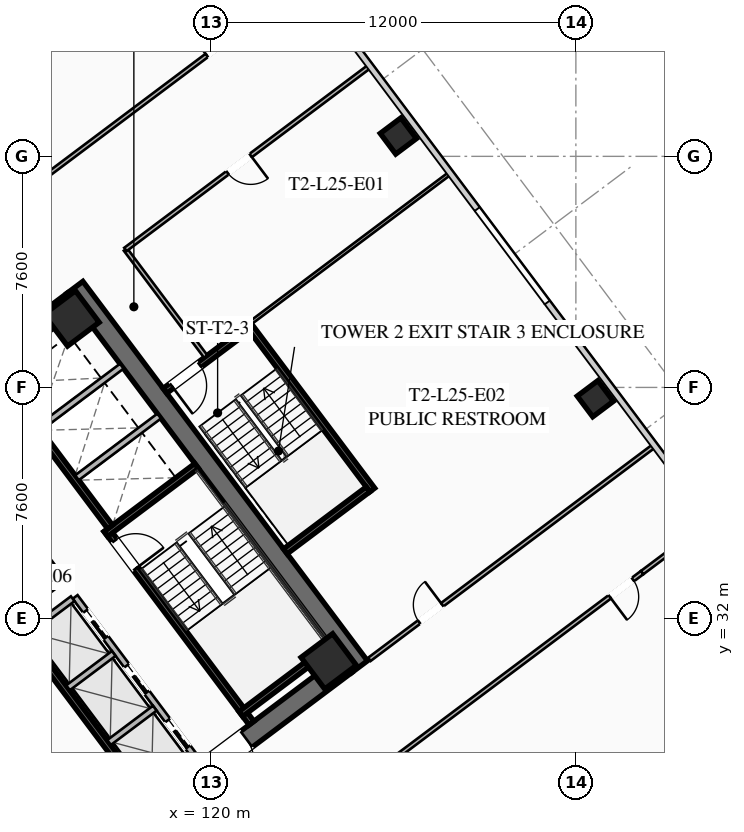
"""IFC4 building model, lengths in metres.
Left out: names, types, materials, properties, quantities, classifications, styles, units other than length and angle.
Written with IfcOpenShell. Run it as: python <this file> out.ifc"""

import sys

from ifc_helpers import new_model, si_unit, direction, frame, frame_2d, origin, origin_2d, place, context, subcontext, project, spatial, rectangle, hollow_rectangle, extrude, element, fill, save


model = new_model("IFC4")
c1 = context("Model", 3, precision=1e-05, world=origin(), true_north=direction((0.0, 1.0)))
c2 = subcontext(c1, "Body", "Model", "MODEL_VIEW")
j1 = project(units=[si_unit("LENGTHUNIT", "METRE"), si_unit("PLANEANGLEUNIT", "RADIAN")], contexts=[c1])
p1 = place(None, origin())
s1 = spatial("IfcSite", under=j1, at=p1, CompositionType="ELEMENT")
p2 = place(p1, origin())
s2 = spatial("IfcBuilding", under=s1, at=p2, CompositionType="ELEMENT")
p3 = place(p2, frame((0.0, 0.0, 95.6)))
s3 = spatial("IfcBuildingStorey", under=s2, at=p3, CompositionType="ELEMENT", Elevation=95.6)
p4 = place(p3, frame((115.524, 42.893, 0.0), z_axis=(0.0, 0.0, 1.0), x_axis=(0.600005007985, -0.799996243986, 0.0)))
e1 = element("IfcWall", 1, at=p4, inside=s3, PredefinedType="SHEAR", context=c2, shape_type="SweptSolid", body=[
    extrude(rectangle(XDim=15.6, YDim=0.65, at=frame_2d((7.8, 0.0))), origin(), (0.0, 0.0, 1.0), 3.55),
])
p5 = place(p3, frame((124.429, 30.478, 0.0), z_axis=(0.0, 0.0, 1.0), x_axis=(-0.799998028465, -0.600002628705, 0.0)))
e2 = element("IfcWall", 2, at=p5, inside=s3, PredefinedType="SHEAR", context=c2, shape_type="SweptSolid", body=[
    extrude(rectangle(XDim=14.86, YDim=0.65, at=frame_2d((7.43, 0.0))), origin(), (0.0, 0.0, 1.0), 3.55),
])
p6 = place(p5, frame((9.13, 0.0, 0.0)))
e3 = element("IfcOpeningElement", 3, at=p6, cuts=e2, PredefinedType="OPENING", context=c2, shape_type="SweptSolid", body=[
    extrude(rectangle(XDim=1.25, YDim=2.25, at=frame_2d((0.625, 1.125))), frame((0.0, 0.335, 0.0), z_axis=(0.0, -1.0, 0.0), x_axis=(1.0, 0.0, 0.0)), (0.0, 0.0, 1.0), 0.67),
])
p7 = place(p5, frame((4.08, 0.0, 0.0)))
e4 = element("IfcOpeningElement", 4, at=p7, cuts=e2, PredefinedType="OPENING", context=c2, shape_type="SweptSolid", body=[
    extrude(rectangle(XDim=1.25, YDim=2.25, at=frame_2d((0.625, 1.125))), frame((0.0, 0.335, 0.0), z_axis=(0.0, -1.0, 0.0), x_axis=(1.0, 0.0, 0.0)), (0.0, 0.0, 1.0), 0.67),
])
p8 = place(p3, frame((103.571, 33.522, 0.0), z_axis=(0.0, 0.0, 1.0), x_axis=(0.799998028465, 0.600002628705, 0.0)))
e5 = element("IfcWall", 5, at=p8, inside=s3, PredefinedType="SHEAR", context=c2, shape_type="SweptSolid", body=[
    extrude(rectangle(XDim=14.86, YDim=0.65, at=frame_2d((7.43, 0.0))), origin(), (0.0, 0.0, 1.0), 3.55),
])
p9 = place(p8, frame((4.48, 0.0, 0.0)))
e6 = element("IfcOpeningElement", 6, at=p9, cuts=e5, PredefinedType="OPENING", context=c2, shape_type="SweptSolid", body=[
    extrude(rectangle(XDim=1.25, YDim=2.25, at=frame_2d((0.625, 1.125))), frame((0.0, 0.335, 0.0), z_axis=(0.0, -1.0, 0.0), x_axis=(1.0, 0.0, 0.0)), (0.0, 0.0, 1.0), 0.67),
])
p10 = place(p8, frame((9.53, 0.0, 0.0)))
e7 = element("IfcOpeningElement", 7, at=p10, cuts=e5, PredefinedType="OPENING", context=c2, shape_type="SweptSolid", body=[
    extrude(rectangle(XDim=1.25, YDim=2.25, at=frame_2d((0.625, 1.125))), frame((0.0, 0.335, 0.0), z_axis=(0.0, -1.0, 0.0), x_axis=(1.0, 0.0, 0.0)), (0.0, 0.0, 1.0), 0.67),
])
for number, where, z_axis, x_axis in (
    (8, (123.87, 30.59, 0.0), (0.0, 0.0, 1.0), (0.8, 0.6, 0.0)),
    (9, (115.41, 41.87, 0.0), (0.0, 0.0, 1.0), (0.8, 0.6, 0.0)),
):
    element("IfcColumn", number, at=place(p3, frame(where, z_axis=z_axis, x_axis=x_axis)), inside=s3, PredefinedType="COLUMN", context=c2, shape_type="SweptSolid", body=[
        extrude(hollow_rectangle(XDim=1.3, YDim=1.3, WallThickness=0.05, at=origin_2d()), origin(), (0.0, 0.0, 1.0), 3.35),
    ])
for number, where, z_axis, x_axis in (
    (10, (132.64, 39.23, 0.0), (0.0, 0.0, 1.0), (0.8, 0.6, 0.0)),
    (11, (126.16, 47.87, 0.0), (0.0, 0.0, 1.0), (0.8, 0.6, 0.0)),
):
    element("IfcColumn", number, at=place(p3, frame(where, z_axis=z_axis, x_axis=x_axis)), inside=s3, PredefinedType="COLUMN", context=c2, shape_type="SweptSolid", body=[
        extrude(hollow_rectangle(XDim=0.85, YDim=0.85, WallThickness=0.035, at=origin_2d()), origin(), (0.0, 0.0, 1.0), 3.35),
    ])
p11 = place(p3, frame((116.56, 34.92, 0.0), z_axis=(0.0, 0.0, 1.0), x_axis=(0.600009827119, -0.799992629566, 0.0)))
e12 = element("IfcWall", 12, at=p11, inside=s3, PredefinedType="SHEAR", context=c2, shape_type="SweptSolid", body=[
    extrude(rectangle(XDim=7.95, YDim=0.2, at=frame_2d((3.975, 0.0))), origin(), (0.0, 0.0, 1.0), 3.35),
])
p12 = place(p11, frame((0.45, 0.0, 0.0)))
e13 = element("IfcOpeningElement", 13, at=p12, cuts=e12, PredefinedType="OPENING", context=c2, shape_type="SweptSolid", body=[
    extrude(rectangle(XDim=1.15, YDim=2.2, at=frame_2d((0.575, 1.1))), frame((0.0, 0.11, 0.0), z_axis=(0.0, -1.0, 0.0), x_axis=(1.0, 0.0, 0.0)), (0.0, 0.0, 1.0), 0.22),
])
for number, where, z_axis, x_axis in (
    (14, (116.54, 34.78, 0.0), (0.0, 0.0, 1.0), (0.8, 0.6, 0.0)),
    (15, (120.98, 28.86, 0.0), (0.0, 0.0, 1.0), (0.8, 0.6, 0.0)),
):
    element("IfcWall", number, at=place(p3, frame(where, z_axis=z_axis, x_axis=x_axis)), inside=s3, PredefinedType="SHEAR", context=c2, shape_type="SweptSolid", body=[
        extrude(rectangle(XDim=3.73, YDim=0.2, at=frame_2d((1.865, 0.0))), origin(), (0.0, 0.0, 1.0), 3.35),
    ])
p13 = place(p3, frame((117.938, 26.016, 0.0), z_axis=(0.0, 0.0, 1.0), x_axis=(-0.600005463273, 0.799995902516, 0.0)))
e16 = element("IfcWall", 16, at=p13, inside=s3, PredefinedType="SHEAR", context=c2, shape_type="SweptSolid", body=[
    extrude(rectangle(XDim=14.3, YDim=0.2, at=frame_2d((7.15, 0.0))), origin(), (0.0, 0.0, 1.0), 3.35),
])
p14 = place(p3, frame((115.13, 23.91, 0.0), z_axis=(0.0, 0.0, 1.0), x_axis=(-0.599975393228, 0.800018454488, 0.0)))
e17 = element("IfcWall", 17, at=p14, inside=s3, PredefinedType="SHEAR", context=c2, shape_type="SweptSolid", body=[
    extrude(rectangle(XDim=6.35, YDim=0.2, at=frame_2d((3.175, 0.0))), origin(), (0.0, 0.0, 1.0), 3.35),
])
p15 = place(p14, frame((4.775, 0.0, 0.0)))
e18 = element("IfcOpeningElement", 18, at=p15, cuts=e17, PredefinedType="OPENING", context=c2, shape_type="SweptSolid", body=[
    extrude(rectangle(XDim=1.3, YDim=2.25, at=frame_2d((0.65, 1.125))), frame((0.0, 0.11, 0.0), z_axis=(0.0, -1.0, 0.0), x_axis=(1.0, 0.0, 0.0)), (0.0, 0.0, 1.0), 0.22),
])
p16 = place(p14, frame((2.775, 0.0, 0.0)))
e19 = element("IfcOpeningElement", 19, at=p16, cuts=e17, PredefinedType="OPENING", context=c2, shape_type="SweptSolid", body=[
    extrude(rectangle(XDim=1.3, YDim=2.25, at=frame_2d((0.65, 1.125))), frame((0.0, 0.11, 0.0), z_axis=(0.0, -1.0, 0.0), x_axis=(1.0, 0.0, 0.0)), (0.0, 0.0, 1.0), 0.22),
])
p17 = place(p14, frame((0.575, 0.0, 0.0)))
e20 = element("IfcOpeningElement", 20, at=p17, cuts=e17, PredefinedType="OPENING", context=c2, shape_type="SweptSolid", body=[
    extrude(rectangle(XDim=1.3, YDim=2.25, at=frame_2d((0.65, 1.125))), frame((0.0, 0.11, 0.0), z_axis=(0.0, -1.0, 0.0), x_axis=(1.0, 0.0, 0.0)), (0.0, 0.0, 1.0), 0.22),
])
p18 = place(p3, frame((112.87, 40.09, 0.0), z_axis=(0.0, 0.0, 1.0), x_axis=(0.599975393228, -0.800018454488, 0.0)))
e21 = element("IfcWall", 21, at=p18, inside=s3, PredefinedType="SHEAR", context=c2, shape_type="SweptSolid", body=[
    extrude(rectangle(XDim=6.35, YDim=0.2, at=frame_2d((3.175, 0.0))), origin(), (0.0, 0.0, 1.0), 3.35),
])
for number, where, z_axis, x_axis in (
    (22, (115.59, 36.63, 0.0), (0.0, 0.0, 1.0), (0.8, 0.6, 0.0)),
    (23, (114.36, 38.27, 0.0), (0.0, 0.0, 1.0), (0.8, 0.6, 0.0)),
):
    element("IfcWall", number, at=place(p3, frame(where, z_axis=z_axis, x_axis=x_axis)), inside=s3, PredefinedType="SOLIDWALL", context=c2, shape_type="SweptSolid", body=[
        extrude(rectangle(XDim=3.38, YDim=0.2, at=frame_2d((1.69, 0.0))), origin(), (0.0, 0.0, 1.0), 3.35),
    ])
p19 = place(p3, frame((119.61, 27.27, 0.0), z_axis=(0.0, 0.0, 1.0), x_axis=(-0.600011488909, 0.79999138319, 0.0)))
e24 = element("IfcWall", 24, at=p19, inside=s3, PredefinedType="SOLIDWALL", context=c2, shape_type="SweptSolid", body=[
    extrude(rectangle(XDim=6.8, YDim=0.2, at=frame_2d((3.4, 0.0))), origin(), (0.0, 0.0, 1.0), 3.35),
])
p20 = place(p19, frame((0.625, 0.0, 0.0)))
e25 = element("IfcOpeningElement", 25, at=p20, cuts=e24, PredefinedType="OPENING", context=c2, shape_type="SweptSolid", body=[
    extrude(rectangle(XDim=1.1, YDim=2.2, at=frame_2d((0.55, 1.1))), frame((0.0, 0.11, 0.0), z_axis=(0.0, -1.0, 0.0), x_axis=(1.0, 0.0, 0.0)), (0.0, 0.0, 1.0), 0.22),
])
p21 = place(p19, frame((2.875, 0.0, 0.0)))
e26 = element("IfcOpeningElement", 26, at=p21, cuts=e24, PredefinedType="OPENING", context=c2, shape_type="SweptSolid", body=[
    extrude(rectangle(XDim=1.1, YDim=2.2, at=frame_2d((0.55, 1.1))), frame((0.0, 0.11, 0.0), z_axis=(0.0, -1.0, 0.0), x_axis=(1.0, 0.0, 0.0)), (0.0, 0.0, 1.0), 0.22),
])
p22 = place(p19, frame((5.125, 0.0, 0.0)))
e27 = element("IfcOpeningElement", 27, at=p22, cuts=e24, PredefinedType="OPENING", context=c2, shape_type="SweptSolid", body=[
    extrude(rectangle(XDim=1.1, YDim=2.2, at=frame_2d((0.55, 1.1))), frame((0.0, 0.11, 0.0), z_axis=(0.0, -1.0, 0.0), x_axis=(1.0, 0.0, 0.0)), (0.0, 0.0, 1.0), 0.22),
])
p23 = place(p3, frame((116.646, 27.922, 0.0), z_axis=(0.0, 0.0, 1.0), x_axis=(0.8, 0.6, 0.0)))
e28 = element("IfcWall", 28, at=p23, inside=s3, PredefinedType="SOLIDWALL", context=c2, shape_type="SweptSolid", body=[
    extrude(rectangle(XDim=1.88, YDim=0.2, at=frame_2d((0.94, 0.0))), origin(), (0.0, 0.0, 1.0), 3.35),
])
p24 = place(p3, frame((115.296, 29.722, 0.0), z_axis=(0.0, 0.0, 1.0), x_axis=(0.799984418148, 0.600020775241, 0.0)))
e29 = element("IfcWall", 29, at=p24, inside=s3, PredefinedType="SOLIDWALL", context=c2, shape_type="SweptSolid", body=[
    extrude(rectangle(XDim=1.88, YDim=0.2, at=frame_2d((0.94, 0.0))), origin(), (0.0, 0.0, 1.0), 3.35),
])
p25 = place(p3, frame((113.946, 31.522, 0.0), z_axis=(0.0, 0.0, 1.0), x_axis=(0.8, 0.6, 0.0)))
e30 = element("IfcWall", 30, at=p25, inside=s3, PredefinedType="SOLIDWALL", context=c2, shape_type="SweptSolid", body=[
    extrude(rectangle(XDim=1.88, YDim=0.2, at=frame_2d((0.94, 0.0))), origin(), (0.0, 0.0, 1.0), 3.35),
])
p26 = place(p3, frame((115.11, 33.27, 0.0), z_axis=(0.0, 0.0, 1.0), x_axis=(-0.600011488909, 0.79999138319, 0.0)))
e31 = element("IfcWall", 31, at=p26, inside=s3, PredefinedType="SOLIDWALL", context=c2, shape_type="SweptSolid", body=[
    extrude(rectangle(XDim=6.8, YDim=0.2, at=frame_2d((3.4, 0.0))), origin(), (0.0, 0.0, 1.0), 3.35),
])
p27 = place(p3, frame((113.526, 32.082, 0.0), z_axis=(0.0, 0.0, 1.0), x_axis=(0.800046745961, 0.599937666993, 0.0)))
e32 = element("IfcWall", 32, at=p27, inside=s3, PredefinedType="SOLIDWALL", context=c2, shape_type="SweptSolid", body=[
    extrude(rectangle(XDim=1.88, YDim=0.2, at=frame_2d((0.94, 0.0))), origin(), (0.0, 0.0, 1.0), 3.35),
])
p28 = place(p3, frame((125.304, 36.228, 0.0), z_axis=(0.0, 0.0, 1.0), x_axis=(-0.59998851072, 0.800008616831, 0.0)))
e33 = element("IfcWall", 33, at=p28, inside=s3, PredefinedType="SHEAR", context=c2, shape_type="SweptSolid", body=[
    extrude(rectangle(XDim=6.8, YDim=0.2, at=frame_2d((3.4, 0.0))), origin(), (0.0, 0.0, 1.0), 3.35),
])
p29 = place(p3, frame((121.204, 41.528, 0.0), z_axis=(0.0, 0.0, 1.0), x_axis=(-0.800017232136, -0.599977023131, 0.0)))
e34 = element("IfcWall", 34, at=p29, inside=s3, PredefinedType="SHEAR", context=c2, shape_type="SweptSolid", body=[
    extrude(rectangle(XDim=3.4, YDim=0.2, at=frame_2d((1.7, 0.0))), origin(), (0.0, 0.0, 1.0), 3.35),
])
p30 = place(p29, frame((1.975, 0.0, 0.0)))
e35 = element("IfcOpeningElement", 35, at=p30, cuts=e34, PredefinedType="OPENING", context=c2, shape_type="SweptSolid", body=[
    extrude(rectangle(XDim=1.15, YDim=2.2, at=frame_2d((0.575, 1.1))), frame((0.0, 0.11, 0.0), z_axis=(0.0, -1.0, 0.0), x_axis=(1.0, 0.0, 0.0)), (0.0, 0.0, 1.0), 0.22),
])
p31 = place(p3, frame((122.444, 34.208, 0.0), z_axis=(0.0, 0.0, 1.0), x_axis=(0.79999138319, 0.600011488909, 0.0)))
e36 = element("IfcWall", 36, at=p31, inside=s3, PredefinedType="SHEAR", context=c2, shape_type="SweptSolid", body=[
    extrude(rectangle(XDim=3.4, YDim=0.2, at=frame_2d((1.7, 0.0))), origin(), (0.0, 0.0, 1.0), 3.35),
])
p32 = place(p3, frame((119.824, 40.618, 0.0), z_axis=(0.0, 0.0, 1.0), x_axis=(-0.599982243973, 0.800013316712, 0.0)))
e37 = element("IfcWall", 37, at=p32, inside=s3, PredefinedType="PARTITIONING", context=c2, shape_type="SweptSolid", body=[
    extrude(rectangle(XDim=4.4, YDim=0.135, at=frame_2d((2.2, 0.0))), origin(), (0.0, 0.0, 1.0), 2.703),
])
p33 = place(p3, frame((98.276, 34.332, 0.0), z_axis=(0.0, 0.0, 1.0), x_axis=(0.800003113347, 0.599995848849, 0.0)))
e38 = element("IfcWall", 38, at=p33, inside=s3, PredefinedType="PARTITIONING", context=c2, shape_type="SweptSolid", body=[
    extrude(rectangle(XDim=28.23, YDim=0.135, at=frame_2d((14.115, 0.0))), origin(), (0.0, 0.0, 1.0), 2.703),
])
p34 = place(p33, frame((0.3, 0.0, 0.0)))
e39 = element("IfcOpeningElement", 39, at=p34, cuts=e38, PredefinedType="OPENING", context=c2, shape_type="SweptSolid", body=[
    extrude(rectangle(XDim=0.95, YDim=2.05, at=frame_2d((0.475, 1.025))), frame((0.0, 0.077, 0.0), z_axis=(0.0, -1.0, 0.0), x_axis=(1.0, 0.0, 0.0)), (0.0, 0.0, 1.0), 0.155),
])
p35 = place(p33, frame((11.023, 0.0, 0.0)))
e40 = element("IfcOpeningElement", 40, at=p35, cuts=e38, PredefinedType="OPENING", context=c2, shape_type="SweptSolid", body=[
    extrude(rectangle(XDim=0.95, YDim=2.05, at=frame_2d((0.475, 1.025))), frame((0.0, 0.077, 0.0), z_axis=(0.0, -1.0, 0.0), x_axis=(1.0, 0.0, 0.0)), (0.0, 0.0, 1.0), 0.155),
])
p36 = place(p33, frame((26.98, 0.0, 0.0)))
e41 = element("IfcOpeningElement", 41, at=p36, cuts=e38, PredefinedType="OPENING", context=c2, shape_type="SweptSolid", body=[
    extrude(rectangle(XDim=0.95, YDim=2.05, at=frame_2d((0.475, 1.025))), frame((0.0, 0.077, 0.0), z_axis=(0.0, -1.0, 0.0), x_axis=(1.0, 0.0, 0.0)), (0.0, 0.0, 1.0), 0.155),
])
p37 = place(p3, frame((134.18, 33.51, 0.0), z_axis=(0.0, 0.0, 1.0), x_axis=(-0.8, -0.6, 0.0)))
e42 = element("IfcWall", 42, at=p37, inside=s3, PredefinedType="PARTITIONING", context=c2, shape_type="SweptSolid", body=[
    extrude(rectangle(XDim=28.23, YDim=0.135, at=frame_2d((14.115, 0.0))), origin(), (0.0, 0.0, 1.0), 2.703),
])
p38 = place(p37, frame((26.9, 0.0, 0.0)))
e43 = element("IfcOpeningElement", 43, at=p38, cuts=e42, PredefinedType="OPENING", context=c2, shape_type="SweptSolid", body=[
    extrude(rectangle(XDim=0.95, YDim=2.05, at=frame_2d((0.475, 1.025))), frame((0.0, 0.077, 0.0), z_axis=(0.0, -1.0, 0.0), x_axis=(1.0, 0.0, 0.0)), (0.0, 0.0, 1.0), 0.155),
])
p39 = place(p37, frame((20.314, 0.0, 0.0)))
e44 = element("IfcOpeningElement", 44, at=p39, cuts=e42, PredefinedType="OPENING", context=c2, shape_type="SweptSolid", body=[
    extrude(rectangle(XDim=0.95, YDim=2.05, at=frame_2d((0.475, 1.025))), frame((0.0, 0.077, 0.0), z_axis=(0.0, -1.0, 0.0), x_axis=(1.0, 0.0, 0.0)), (0.0, 0.0, 1.0), 0.155),
])
p40 = place(p37, frame((0.38, 0.0, 0.0)))
e45 = element("IfcOpeningElement", 45, at=p40, cuts=e42, PredefinedType="OPENING", context=c2, shape_type="SweptSolid", body=[
    extrude(rectangle(XDim=0.95, YDim=2.05, at=frame_2d((0.475, 1.025))), frame((0.0, 0.077, 0.0), z_axis=(0.0, -1.0, 0.0), x_axis=(1.0, 0.0, 0.0)), (0.0, 0.0, 1.0), 0.155),
])
p41 = place(p3, frame((134.18, 33.51, 0.0), z_axis=(0.0, 0.0, 1.0), x_axis=(0.8000207031, 0.599972394874, 0.0)))
e46 = element("IfcWall", 46, at=p41, inside=s3, PredefinedType="PARTITIONING", context=c2, shape_type="SweptSolid", body=[
    extrude(rectangle(XDim=2.83, YDim=0.135, at=frame_2d((1.415, 0.0))), origin(), (0.0, 0.0, 1.0), 2.703),
])
p42 = place(p3, frame((125.224, 50.168, 0.0), z_axis=(0.0, 0.0, 1.0), x_axis=(-0.8, -0.6, 0.0)))
e47 = element("IfcWall", 47, at=p42, inside=s3, PredefinedType="PARTITIONING", context=c2, shape_type="SweptSolid", body=[
    extrude(rectangle(XDim=10.05, YDim=0.135, at=frame_2d((5.025, 0.0))), origin(), (0.0, 0.0, 1.0), 2.703),
])
p43 = place(p42, frame((4.9, 0.0, 0.0)))
e48 = element("IfcOpeningElement", 48, at=p43, cuts=e47, PredefinedType="OPENING", context=c2, shape_type="SweptSolid", body=[
    extrude(rectangle(XDim=0.95, YDim=2.05, at=frame_2d((0.475, 1.025))), frame((0.0, 0.077, 0.0), z_axis=(0.0, -1.0, 0.0), x_axis=(1.0, 0.0, 0.0)), (0.0, 0.0, 1.0), 0.155),
])
p44 = place(p3, frame((125.208, 30.656, 0.0), z_axis=(0.0, 0.0, 1.0), x_axis=(0.8, 0.6, 0.0)))
e49 = element("IfcWall", 49, at=p44, inside=s3, PredefinedType="PARTITIONING", context=c2, shape_type="SweptSolid", body=[
    extrude(rectangle(XDim=11.72, YDim=0.135, at=frame_2d((5.86, 0.0))), origin(), (0.0, 0.0, 1.0), 2.703),
])
p45 = place(p44, frame((2.045, 0.0, 0.0)))
e50 = element("IfcOpeningElement", 50, at=p45, cuts=e49, PredefinedType="OPENING", context=c2, shape_type="SweptSolid", body=[
    extrude(rectangle(XDim=0.95, YDim=2.05, at=frame_2d((0.475, 1.025))), frame((0.0, 0.077, 0.0), z_axis=(0.0, -1.0, 0.0), x_axis=(1.0, 0.0, 0.0)), (0.0, 0.0, 1.0), 0.155),
])
p46 = place(p3, frame((127.864, 46.648, 0.0), z_axis=(0.0, 0.0, 1.0), x_axis=(-0.800007145523, -0.599990472518, 0.0)))
e51 = element("IfcWall", 51, at=p46, inside=s3, PredefinedType="PARTITIONING", context=c2, shape_type="SweptSolid", body=[
    extrude(rectangle(XDim=8.2, YDim=0.11, at=frame_2d((4.1, 0.0))), origin(), (0.0, 0.0, 1.0), 2.703),
])
p47 = place(p7, origin())
e52 = element("IfcDoor", 52, at=p47, inside=s3, OperationType="SINGLE_SWING_RIGHT", PredefinedType="DOOR", context=c2, shape_type="SweptSolid", body=[
    extrude(rectangle(XDim=1.25, YDim=2.25, at=frame_2d((0.625, 1.125))), frame((0.0, 0.025, 0.0), z_axis=(0.0, -1.0, 0.0), x_axis=(1.0, 0.0, 0.0)), (0.0, 0.0, 1.0), 0.05),
])
fill(e4, e52)
p48 = place(p12, origin())
e53 = element("IfcDoor", 53, at=p48, inside=s3, OperationType="SINGLE_SWING_RIGHT", PredefinedType="DOOR", context=c2, shape_type="SweptSolid", body=[
    extrude(rectangle(XDim=1.15, YDim=2.2, at=frame_2d((0.575, 1.1))), frame((0.0, 0.025, 0.0), z_axis=(0.0, -1.0, 0.0), x_axis=(1.0, 0.0, 0.0)), (0.0, 0.0, 1.0), 0.05),
])
fill(e13, e53)
p49 = place(p30, origin())
e54 = element("IfcDoor", 54, at=p49, inside=s3, OperationType="SINGLE_SWING_RIGHT", PredefinedType="DOOR", context=c2, shape_type="SweptSolid", body=[
    extrude(rectangle(XDim=1.15, YDim=2.2, at=frame_2d((0.575, 1.1))), frame((0.0, 0.025, 0.0), z_axis=(0.0, -1.0, 0.0), x_axis=(1.0, 0.0, 0.0)), (0.0, 0.0, 1.0), 0.05),
])
fill(e35, e54)
p50 = place(p36, origin())
e55 = element("IfcDoor", 55, at=p50, inside=s3, OperationType="SINGLE_SWING_LEFT", PredefinedType="DOOR", context=c2, shape_type="SweptSolid", body=[
    extrude(rectangle(XDim=0.95, YDim=2.05, at=frame_2d((0.475, 1.025))), frame((0.0, 0.025, 0.0), z_axis=(0.0, -1.0, 0.0), x_axis=(1.0, 0.0, 0.0)), (0.0, 0.0, 1.0), 0.05),
])
fill(e41, e55)
p51 = place(p40, origin())
e56 = element("IfcDoor", 56, at=p51, inside=s3, OperationType="SINGLE_SWING_RIGHT", PredefinedType="DOOR", context=c2, shape_type="SweptSolid", body=[
    extrude(rectangle(XDim=0.95, YDim=2.05, at=frame_2d((0.475, 1.025))), frame((0.0, 0.025, 0.0), z_axis=(0.0, -1.0, 0.0), x_axis=(1.0, 0.0, 0.0)), (0.0, 0.0, 1.0), 0.05),
])
fill(e45, e56)
p52 = place(p43, origin())
e57 = element("IfcDoor", 57, at=p52, inside=s3, OperationType="SINGLE_SWING_LEFT", PredefinedType="DOOR", context=c2, shape_type="SweptSolid", body=[
    extrude(rectangle(XDim=0.95, YDim=2.05, at=frame_2d((0.475, 1.025))), frame((0.0, 0.025, 0.0), z_axis=(0.0, -1.0, 0.0), x_axis=(1.0, 0.0, 0.0)), (0.0, 0.0, 1.0), 0.05),
])
fill(e48, e57)
p53 = place(p45, origin())
e58 = element("IfcDoor", 58, at=p53, inside=s3, OperationType="SINGLE_SWING_RIGHT", PredefinedType="DOOR", context=c2, shape_type="SweptSolid", body=[
    extrude(rectangle(XDim=0.95, YDim=2.05, at=frame_2d((0.475, 1.025))), frame((0.0, 0.025, 0.0), z_axis=(0.0, -1.0, 0.0), x_axis=(1.0, 0.0, 0.0)), (0.0, 0.0, 1.0), 0.05),
])
fill(e50, e58)
p54 = place(p20, origin())
e59 = element("IfcDoor", 59, at=p54, inside=s3, OperationType="SLIDING_TO_LEFT", PredefinedType="DOOR", context=c2, shape_type="SweptSolid", body=[
    extrude(rectangle(XDim=1.1, YDim=2.2, at=frame_2d((0.55, 1.1))), frame((0.0, 0.025, 0.0), z_axis=(0.0, -1.0, 0.0), x_axis=(1.0, 0.0, 0.0)), (0.0, 0.0, 1.0), 0.05),
])
fill(e25, e59)
p55 = place(p21, origin())
e60 = element("IfcDoor", 60, at=p55, inside=s3, OperationType="SLIDING_TO_LEFT", PredefinedType="DOOR", context=c2, shape_type="SweptSolid", body=[
    extrude(rectangle(XDim=1.1, YDim=2.2, at=frame_2d((0.55, 1.1))), frame((0.0, 0.025, 0.0), z_axis=(0.0, -1.0, 0.0), x_axis=(1.0, 0.0, 0.0)), (0.0, 0.0, 1.0), 0.05),
])
fill(e26, e60)
p56 = place(p22, origin())
e61 = element("IfcDoor", 61, at=p56, inside=s3, OperationType="SLIDING_TO_LEFT", PredefinedType="DOOR", context=c2, shape_type="SweptSolid", body=[
    extrude(rectangle(XDim=1.1, YDim=2.2, at=frame_2d((0.55, 1.1))), frame((0.0, 0.025, 0.0), z_axis=(0.0, -1.0, 0.0), x_axis=(1.0, 0.0, 0.0)), (0.0, 0.0, 1.0), 0.05),
])
fill(e27, e61)
save(model, sys.argv[1])
